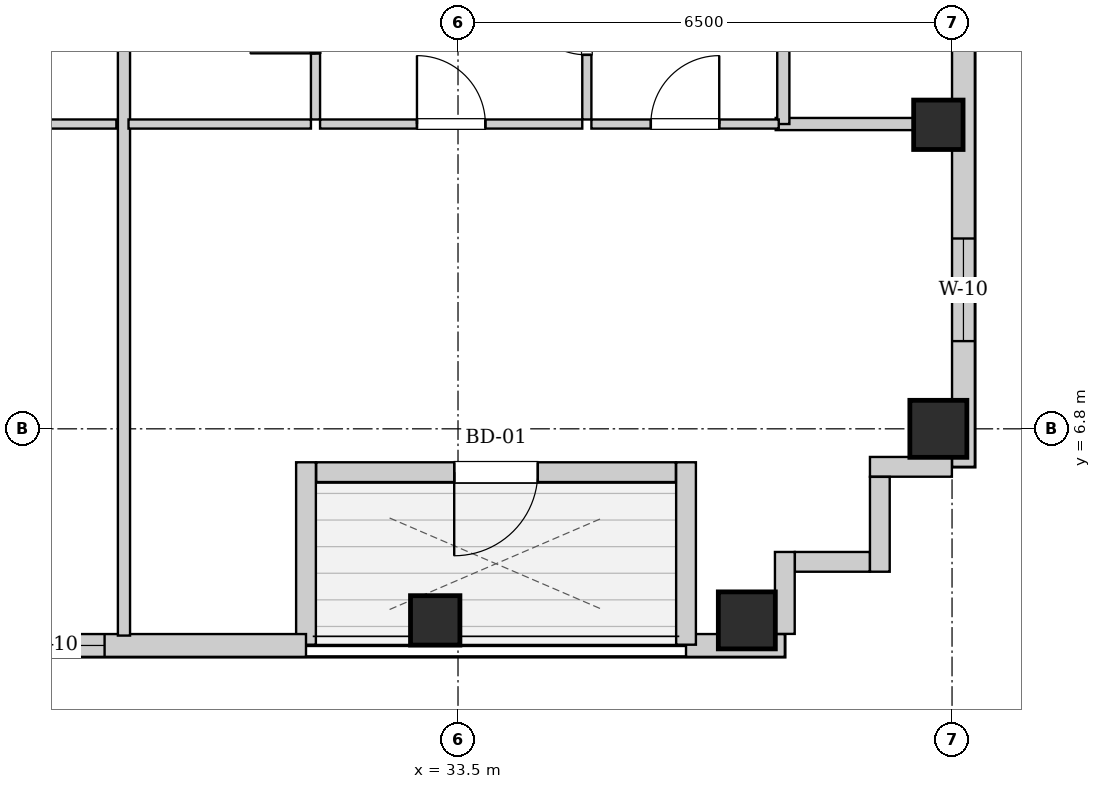
"""IFC4 building model, lengths in metres.
Left out: names, types, materials, properties, quantities, classifications, styles, units other than length and angle.
Written with IfcOpenShell. Run it as: python <this file> out.ifc"""

import sys

from ifc_helpers import new_model, si_unit, direction, frame, frame_2d, origin, origin_2d, place, context, subcontext, project, spatial, rectangle, extrude, element, fill, save


model = new_model("IFC4")
c1 = context("Model", 3, precision=1e-05, world=origin(), true_north=direction((0.0, 1.0)))
c2 = subcontext(c1, "Body", "Model", "MODEL_VIEW")
j1 = project(units=[si_unit("LENGTHUNIT", "METRE"), si_unit("PLANEANGLEUNIT", "RADIAN")], contexts=[c1])
p1 = place(None, origin())
s1 = spatial("IfcSite", under=j1, at=p1, CompositionType="ELEMENT")
p2 = place(p1, origin())
s2 = spatial("IfcBuilding", under=s1, at=p2, CompositionType="ELEMENT")
p3 = place(p2, frame((0.0, 0.0, 214.0)))
s3 = spatial("IfcBuildingStorey", under=s2, at=p3, CompositionType="ELEMENT", Elevation=214.0)
p4 = place(p3, frame((33.2, 4.28, 0.0), z_axis=(0.0, 0.0, 1.0), x_axis=(1.0, 0.0, 0.0)))
e1 = element("IfcColumn", 1, at=p4, inside=s3, PredefinedType="COLUMN", context=c2, shape_type="SweptSolid", body=[
    extrude(rectangle(XDim=0.65, YDim=0.65, at=origin_2d()), origin(), (0.0, 0.0, 1.0), 3.3),
])
for number, where, z_axis, x_axis in (
    (2, (37.3, 4.28, 0.0), (0.0, 0.0, 1.0), (1.0, 0.0, 0.0)),
    (3, (39.82, 6.8, 0.0), (0.0, 0.0, 1.0), (1.0, 0.0, 0.0)),
):
    element("IfcColumn", number, at=place(p3, frame(where, z_axis=z_axis, x_axis=x_axis)), inside=s3, PredefinedType="COLUMN", context=c2, shape_type="SweptSolid", body=[
        extrude(rectangle(XDim=0.75, YDim=0.75, at=origin_2d()), origin(), (0.0, 0.0, 1.0), 3.3),
    ])
p5 = place(p3, frame((39.82, 10.8, 0.0), z_axis=(0.0, 0.0, 1.0), x_axis=(1.0, 0.0, 0.0)))
e4 = element("IfcColumn", 4, at=p5, inside=s3, PredefinedType="COLUMN", context=c2, shape_type="SweptSolid", body=[
    extrude(rectangle(XDim=0.65, YDim=0.65, at=origin_2d()), origin(), (0.0, 0.0, 1.0), 3.3),
])
p6 = place(p3, frame((40.15, 37.7, 0.0), z_axis=(0.0, 0.0, 1.0), x_axis=(0.0, -1.0, 0.0)))
e5 = element("IfcWall", 5, at=p6, inside=s3, PredefinedType="SOLIDWALL", context=c2, shape_type="SweptSolid", body=[
    extrude(rectangle(XDim=31.4, YDim=0.3, at=frame_2d((15.7, 0.0))), origin(), (0.0, 0.0, 1.0), 3.04),
])
p7 = place(p6, frame((28.396, 0.0, 0.55)))
e6 = element("IfcOpeningElement", 6, at=p7, cuts=e5, PredefinedType="OPENING", context=c2, shape_type="SweptSolid", body=[
    extrude(rectangle(XDim=1.35, YDim=1.2, at=frame_2d((0.675, 0.6))), frame((0.0, 0.16, 0.0), z_axis=(0.0, -1.0, 0.0), x_axis=(1.0, 0.0, 0.0)), (0.0, 0.0, 1.0), 0.32),
])
p8 = place(p6, frame((1.653, 0.0, 0.55)))
e7 = element("IfcOpeningElement", 7, at=p8, cuts=e5, PredefinedType="OPENING", context=c2, shape_type="SweptSolid", body=[
    extrude(rectangle(XDim=1.35, YDim=1.2, at=frame_2d((0.675, 0.6))), frame((0.0, 0.16, 0.0), z_axis=(0.0, -1.0, 0.0), x_axis=(1.0, 0.0, 0.0)), (0.0, 0.0, 1.0), 0.32),
])
p9 = place(p6, frame((18.856, 0.0, 0.55)))
e8 = element("IfcOpeningElement", 8, at=p9, cuts=e5, PredefinedType="OPENING", context=c2, shape_type="SweptSolid", body=[
    extrude(rectangle(XDim=1.35, YDim=1.2, at=frame_2d((0.675, 0.6))), frame((0.0, 0.16, 0.0), z_axis=(0.0, -1.0, 0.0), x_axis=(1.0, 0.0, 0.0)), (0.0, 0.0, 1.0), 0.32),
])
p10 = place(p6, frame((20.466, 0.0, 0.55)))
e9 = element("IfcOpeningElement", 9, at=p10, cuts=e5, PredefinedType="OPENING", context=c2, shape_type="SweptSolid", body=[
    extrude(rectangle(XDim=1.35, YDim=1.2, at=frame_2d((0.675, 0.6))), frame((0.0, 0.16, 0.0), z_axis=(0.0, -1.0, 0.0), x_axis=(1.0, 0.0, 0.0)), (0.0, 0.0, 1.0), 0.32),
])
p11 = place(p6, frame((11.85, 0.0, 0.55)))
e10 = element("IfcOpeningElement", 10, at=p11, cuts=e5, PredefinedType="OPENING", context=c2, shape_type="SweptSolid", body=[
    extrude(rectangle(XDim=1.35, YDim=1.2, at=frame_2d((0.675, 0.6))), frame((0.0, 0.16, 0.0), z_axis=(0.0, -1.0, 0.0), x_axis=(1.0, 0.0, 0.0)), (0.0, 0.0, 1.0), 0.32),
])
p12 = place(p6, frame((9.185, 0.0, 0.55)))
e11 = element("IfcOpeningElement", 11, at=p12, cuts=e5, PredefinedType="OPENING", context=c2, shape_type="SweptSolid", body=[
    extrude(rectangle(XDim=1.35, YDim=1.2, at=frame_2d((0.675, 0.6))), frame((0.0, 0.16, 0.0), z_axis=(0.0, -1.0, 0.0), x_axis=(1.0, 0.0, 0.0)), (0.0, 0.0, 1.0), 0.32),
])
p13 = place(p3, frame((37.8, 3.95, 0.0), z_axis=(0.0, 0.0, 1.0), x_axis=(-1.0, 0.0, 0.0)))
e12 = element("IfcWall", 12, at=p13, inside=s3, PredefinedType="SOLIDWALL", context=c2, shape_type="SweptSolid", body=[
    extrude(rectangle(XDim=1.3, YDim=0.3, at=frame_2d((0.65, 0.0))), origin(), (0.0, 0.0, 1.0), 3.04),
])
p14 = place(p3, frame((36.5, 3.96, 0.0), z_axis=(0.0, 0.0, 1.0), x_axis=(0.0, 1.0, 0.0)))
e13 = element("IfcWall", 13, at=p14, inside=s3, PredefinedType="SOLIDWALL", context=c2, shape_type="SweptSolid", body=[
    extrude(rectangle(XDim=2.4, YDim=0.26, at=frame_2d((1.2, 0.0))), origin(), (0.0, 0.0, 1.0), 3.04),
])
p15 = place(p3, frame((36.366, 6.23, 0.0), z_axis=(0.0, 0.0, 1.0), x_axis=(-1.0, 0.0, 0.0)))
e14 = element("IfcWall", 14, at=p15, inside=s3, PredefinedType="SOLIDWALL", context=c2, shape_type="SweptSolid", body=[
    extrude(rectangle(XDim=4.732, YDim=0.26, at=frame_2d((2.366, 0.0))), origin(), (0.0, 0.0, 1.0), 3.04),
])
p16 = place(p15, frame((1.816, 0.0, 0.0)))
e15 = element("IfcOpeningElement", 15, at=p16, cuts=e14, PredefinedType="OPENING", context=c2, shape_type="SweptSolid", body=[
    extrude(rectangle(XDim=1.1, YDim=2.0, at=frame_2d((0.55, 1.0))), frame((0.0, 0.14, 0.0), z_axis=(0.0, -1.0, 0.0), x_axis=(1.0, 0.0, 0.0)), (0.0, 0.0, 1.0), 0.28),
])
p17 = place(p3, frame((31.5, 6.36, 0.0), z_axis=(0.0, 0.0, 1.0), x_axis=(0.0, -1.0, 0.0)))
e16 = element("IfcWall", 16, at=p17, inside=s3, PredefinedType="SOLIDWALL", context=c2, shape_type="SweptSolid", body=[
    extrude(rectangle(XDim=2.4, YDim=0.26, at=frame_2d((1.2, 0.0))), origin(), (0.0, 0.0, 1.0), 3.04),
])
p18 = place(p3, frame((31.5, 3.95, 0.0), z_axis=(0.0, 0.0, 1.0), x_axis=(-1.0, 0.0, 0.0)))
e17 = element("IfcWall", 17, at=p18, inside=s3, PredefinedType="SOLIDWALL", context=c2, shape_type="SweptSolid", body=[
    extrude(rectangle(XDim=10.65, YDim=0.3, at=frame_2d((5.325, 0.0))), origin(), (0.0, 0.0, 1.0), 3.04),
])
p19 = place(p18, frame((9.0, 0.0, 0.55)))
e18 = element("IfcOpeningElement", 18, at=p19, cuts=e17, PredefinedType="OPENING", context=c2, shape_type="SweptSolid", body=[
    extrude(rectangle(XDim=0.85, YDim=1.2, at=frame_2d((0.425, 0.6))), frame((0.0, 0.16, 0.0), z_axis=(0.0, -1.0, 0.0), x_axis=(1.0, 0.0, 0.0)), (0.0, 0.0, 1.0), 0.32),
])
p20 = place(p18, frame((2.65, 0.0, 0.55)))
e19 = element("IfcOpeningElement", 19, at=p20, cuts=e17, PredefinedType="OPENING", context=c2, shape_type="SweptSolid", body=[
    extrude(rectangle(XDim=1.35, YDim=1.2, at=frame_2d((0.675, 0.6))), frame((0.0, 0.16, 0.0), z_axis=(0.0, -1.0, 0.0), x_axis=(1.0, 0.0, 0.0)), (0.0, 0.0, 1.0), 0.32),
])
p21 = place(p3, frame((39.998, 6.3, 0.0), z_axis=(0.0, 0.0, 1.0), x_axis=(-1.0, 0.0, 0.0)))
e20 = element("IfcWall", 20, at=p21, inside=s3, PredefinedType="SOLIDWALL", context=c2, shape_type="SweptSolid", body=[
    extrude(rectangle(XDim=1.078, YDim=0.26, at=frame_2d((0.539, 0.0))), origin(), (0.0, 0.0, 1.0), 3.04),
])
p22 = place(p3, frame((39.05, 6.168, 0.0), z_axis=(0.0, 0.0, 1.0), x_axis=(0.0, -1.0, 0.0)))
e21 = element("IfcWall", 21, at=p22, inside=s3, PredefinedType="SOLIDWALL", context=c2, shape_type="SweptSolid", body=[
    extrude(rectangle(XDim=1.248, YDim=0.26, at=frame_2d((0.624, 0.0))), origin(), (0.0, 0.0, 1.0), 3.04),
])
p23 = place(p3, frame((38.918, 5.05, 0.0), z_axis=(0.0, 0.0, 1.0), x_axis=(-1.0, 0.0, 0.0)))
e22 = element("IfcWall", 22, at=p23, inside=s3, PredefinedType="SOLIDWALL", context=c2, shape_type="SweptSolid", body=[
    extrude(rectangle(XDim=0.986, YDim=0.26, at=frame_2d((0.493, 0.0))), origin(), (0.0, 0.0, 1.0), 3.04),
])
p24 = place(p3, frame((37.8, 5.18, 0.0), z_axis=(0.0, 0.0, 1.0), x_axis=(0.0, -1.0, 0.0)))
e23 = element("IfcWall", 23, at=p24, inside=s3, PredefinedType="SOLIDWALL", context=c2, shape_type="SweptSolid", body=[
    extrude(rectangle(XDim=1.078, YDim=0.26, at=frame_2d((0.539, 0.0))), origin(), (0.0, 0.0, 1.0), 3.04),
])
p25 = place(p3, frame((25.25, 10.81, 0.0), z_axis=(0.0, 0.0, 1.0), x_axis=(1.0, 0.0, 0.0)))
e24 = element("IfcWall", 24, at=p25, inside=s3, PredefinedType="PARTITIONING", context=c2, shape_type="SweptSolid", body=[
    extrude(rectangle(XDim=3.755, YDim=0.12, at=frame_2d((1.877, 0.0))), origin(), (0.0, 0.0, 1.0), 3.04),
])
p26 = place(p25, frame((1.427, 0.0, 0.0)))
e25 = element("IfcOpeningElement", 25, at=p26, cuts=e24, PredefinedType="OPENING", context=c2, shape_type="SweptSolid", body=[
    extrude(rectangle(XDim=0.9, YDim=2.05, at=frame_2d((0.45, 1.025))), frame((0.0, 0.07, 0.0), z_axis=(0.0, -1.0, 0.0), x_axis=(1.0, 0.0, 0.0)), (0.0, 0.0, 1.0), 0.14),
])
p27 = place(p3, frame((37.68, 10.81, 0.0), z_axis=(0.0, 0.0, 1.0), x_axis=(1.0, 0.0, 0.0)))
e26 = element("IfcWall", 26, at=p27, inside=s3, PredefinedType="PARTITIONING", context=c2, shape_type="SweptSolid", body=[
    extrude(rectangle(XDim=2.34, YDim=0.16, at=frame_2d((1.17, 0.0))), origin(), (0.0, 0.0, 1.0), 3.04),
])
p28 = place(p3, frame((37.78, 10.81, 0.0), z_axis=(0.0, 0.0, 1.0), x_axis=(0.0, 1.0, 0.0)))
e27 = element("IfcWall", 27, at=p28, inside=s3, PredefinedType="PARTITIONING", context=c2, shape_type="SweptSolid", body=[
    extrude(rectangle(XDim=2.66, YDim=0.16, at=frame_2d((1.33, 0.0))), origin(), (0.0, 0.0, 1.0), 3.04),
])
p29 = place(p3, frame((29.105, 4.08, 0.0), z_axis=(0.0, 0.0, 1.0), x_axis=(0.0, 1.0, 0.0)))
e28 = element("IfcWall", 28, at=p29, inside=s3, PredefinedType="PARTITIONING", context=c2, shape_type="SweptSolid", body=[
    extrude(rectangle(XDim=9.39, YDim=0.16, at=frame_2d((4.695, 0.0))), origin(), (0.0, 0.0, 1.0), 3.04),
])
p30 = place(p3, frame((31.625, 10.87, 0.0), z_axis=(0.0, 0.0, 1.0), x_axis=(0.0, 1.0, 0.0)))
e29 = element("IfcWall", 29, at=p30, inside=s3, PredefinedType="PARTITIONING", context=c2, shape_type="SweptSolid", body=[
    extrude(rectangle(XDim=2.6, YDim=0.12, at=frame_2d((1.3, 0.0))), origin(), (0.0, 0.0, 1.0), 3.04),
])
p31 = place(p30, frame((0.87, 0.0, 0.0)))
e30 = element("IfcOpeningElement", 30, at=p31, cuts=e29, PredefinedType="OPENING", context=c2, shape_type="SweptSolid", body=[
    extrude(rectangle(XDim=0.86, YDim=2.05, at=frame_2d((0.43, 1.025))), frame((0.0, 0.07, 0.0), z_axis=(0.0, -1.0, 0.0), x_axis=(1.0, 0.0, 0.0)), (0.0, 0.0, 1.0), 0.14),
])
p32 = place(p3, frame((29.165, 10.81, 0.0), z_axis=(0.0, 0.0, 1.0), x_axis=(1.0, 0.0, 0.0)))
e31 = element("IfcWall", 31, at=p32, inside=s3, PredefinedType="PARTITIONING", context=c2, shape_type="SweptSolid", body=[
    extrude(rectangle(XDim=2.4, YDim=0.12, at=frame_2d((1.2, 0.0))), origin(), (0.0, 0.0, 1.0), 3.04),
])
p33 = place(p3, frame((35.195, 10.87, 0.0), z_axis=(0.0, 0.0, 1.0), x_axis=(0.0, 1.0, 0.0)))
e32 = element("IfcWall", 32, at=p33, inside=s3, PredefinedType="PARTITIONING", context=c2, shape_type="SweptSolid", body=[
    extrude(rectangle(XDim=2.6, YDim=0.12, at=frame_2d((1.3, 0.0))), origin(), (0.0, 0.0, 1.0), 3.04),
])
p34 = place(p33, frame((0.85, 0.0, 0.0)))
e33 = element("IfcOpeningElement", 33, at=p34, cuts=e32, PredefinedType="OPENING", context=c2, shape_type="SweptSolid", body=[
    extrude(rectangle(XDim=0.9, YDim=2.05, at=frame_2d((0.45, 1.025))), frame((0.0, 0.07, 0.0), z_axis=(0.0, -1.0, 0.0), x_axis=(1.0, 0.0, 0.0)), (0.0, 0.0, 1.0), 0.14),
])
p35 = place(p3, frame((31.685, 10.81, 0.0), z_axis=(0.0, 0.0, 1.0), x_axis=(1.0, 0.0, 0.0)))
e34 = element("IfcWall", 34, at=p35, inside=s3, PredefinedType="PARTITIONING", context=c2, shape_type="SweptSolid", body=[
    extrude(rectangle(XDim=3.45, YDim=0.12, at=frame_2d((1.725, 0.0))), origin(), (0.0, 0.0, 1.0), 3.04),
])
p36 = place(p35, frame((1.275, 0.0, 0.0)))
e35 = element("IfcOpeningElement", 35, at=p36, cuts=e34, PredefinedType="OPENING", context=c2, shape_type="SweptSolid", body=[
    extrude(rectangle(XDim=0.9, YDim=2.05, at=frame_2d((0.45, 1.025))), frame((0.0, 0.07, 0.0), z_axis=(0.0, -1.0, 0.0), x_axis=(1.0, 0.0, 0.0)), (0.0, 0.0, 1.0), 0.14),
])
p37 = place(p3, frame((35.255, 10.81, 0.0), z_axis=(0.0, 0.0, 1.0), x_axis=(1.0, 0.0, 0.0)))
e36 = element("IfcWall", 36, at=p37, inside=s3, PredefinedType="PARTITIONING", context=c2, shape_type="SweptSolid", body=[
    extrude(rectangle(XDim=2.465, YDim=0.12, at=frame_2d((1.232, 0.0))), origin(), (0.0, 0.0, 1.0), 3.04),
])
p38 = place(p37, frame((0.782, 0.0, 0.0)))
e37 = element("IfcOpeningElement", 37, at=p38, cuts=e36, PredefinedType="OPENING", context=c2, shape_type="SweptSolid", body=[
    extrude(rectangle(XDim=0.9, YDim=2.05, at=frame_2d((0.45, 1.025))), frame((0.0, 0.07, 0.0), z_axis=(0.0, -1.0, 0.0), x_axis=(1.0, 0.0, 0.0)), (0.0, 0.0, 1.0), 0.14),
])
p39 = place(p31, origin())
e38 = element("IfcDoor", 38, at=p39, inside=s3, OperationType="SINGLE_SWING_LEFT", PredefinedType="DOOR", context=c2, shape_type="SweptSolid", body=[
    extrude(rectangle(XDim=0.86, YDim=2.05, at=frame_2d((0.43, 1.025))), frame((0.0, 0.025, 0.0), z_axis=(0.0, -1.0, 0.0), x_axis=(1.0, 0.0, 0.0)), (0.0, 0.0, 1.0), 0.05),
])
fill(e30, e38)
p40 = place(p34, origin())
e39 = element("IfcDoor", 39, at=p40, inside=s3, OperationType="SINGLE_SWING_RIGHT", PredefinedType="DOOR", context=c2, shape_type="SweptSolid", body=[
    extrude(rectangle(XDim=0.9, YDim=2.05, at=frame_2d((0.45, 1.025))), frame((0.0, 0.025, 0.0), z_axis=(0.0, -1.0, 0.0), x_axis=(1.0, 0.0, 0.0)), (0.0, 0.0, 1.0), 0.05),
])
fill(e33, e39)
p41 = place(p36, origin())
e40 = element("IfcDoor", 40, at=p41, inside=s3, OperationType="SINGLE_SWING_LEFT", PredefinedType="DOOR", context=c2, shape_type="SweptSolid", body=[
    extrude(rectangle(XDim=0.9, YDim=2.05, at=frame_2d((0.45, 1.025))), frame((0.0, 0.025, 0.0), z_axis=(0.0, -1.0, 0.0), x_axis=(1.0, 0.0, 0.0)), (0.0, 0.0, 1.0), 0.05),
])
fill(e35, e40)
p42 = place(p38, origin())
e41 = element("IfcDoor", 41, at=p42, inside=s3, OperationType="SINGLE_SWING_RIGHT", PredefinedType="DOOR", context=c2, shape_type="SweptSolid", body=[
    extrude(rectangle(XDim=0.9, YDim=2.05, at=frame_2d((0.45, 1.025))), frame((0.0, 0.025, 0.0), z_axis=(0.0, -1.0, 0.0), x_axis=(1.0, 0.0, 0.0)), (0.0, 0.0, 1.0), 0.05),
])
fill(e37, e41)
p43 = place(p16, origin())
e42 = element("IfcDoor", 42, at=p43, inside=s3, OperationType="SINGLE_SWING_RIGHT", PredefinedType="DOOR", context=c2, shape_type="SweptSolid", body=[
    extrude(rectangle(XDim=1.1, YDim=2.0, at=frame_2d((0.55, 1.0))), frame((0.0, 0.025, 0.0), z_axis=(0.0, -1.0, 0.0), x_axis=(1.0, 0.0, 0.0)), (0.0, 0.0, 1.0), 0.05),
])
fill(e15, e42)
p44 = place(p20, origin())
e43 = element("IfcWindow", 43, at=p44, inside=s3, PartitioningType="SINGLE_PANEL", PredefinedType="WINDOW", context=c2, shape_type="SweptSolid", body=[
    extrude(rectangle(XDim=1.35, YDim=1.2, at=frame_2d((0.675, 0.6))), frame((0.0, 0.03, 0.0), z_axis=(0.0, -1.0, 0.0), x_axis=(1.0, 0.0, 0.0)), (0.0, 0.0, 1.0), 0.06),
])
fill(e19, e43)
p45 = place(p7, origin())
e44 = element("IfcWindow", 44, at=p45, inside=s3, PartitioningType="SINGLE_PANEL", PredefinedType="WINDOW", context=c2, shape_type="SweptSolid", body=[
    extrude(rectangle(XDim=1.35, YDim=1.2, at=frame_2d((0.675, 0.6))), frame((0.0, 0.03, 0.0), z_axis=(0.0, -1.0, 0.0), x_axis=(1.0, 0.0, 0.0)), (0.0, 0.0, 1.0), 0.06),
])
fill(e6, e44)
save(model, sys.argv[1])
